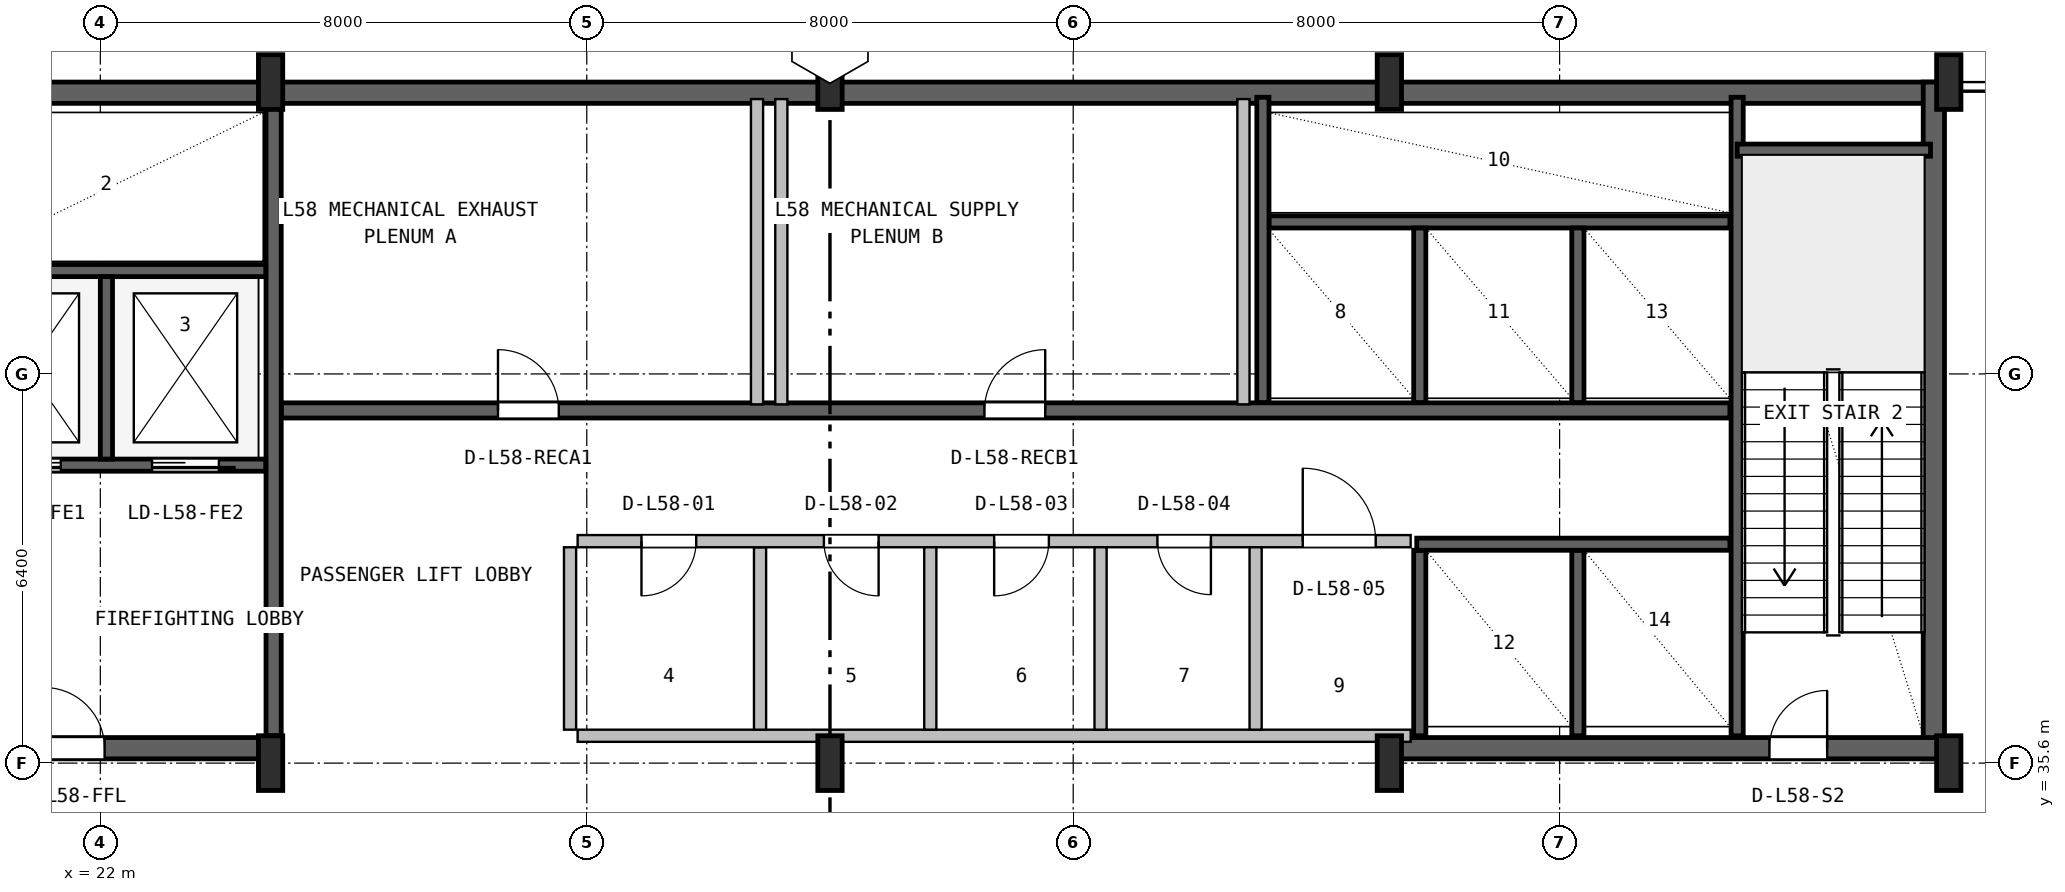
"""IFC4 building model, lengths in metres.
Left out: names, types, materials, properties, quantities, classifications, styles, units other than length and angle.
Written with IfcOpenShell. Run it as: python <this file> out.ifc"""

import sys

from ifc_helpers import new_model, si_unit, direction, frame, frame_2d, origin, origin_2d, place, context, subcontext, project, spatial, rectangle, i_section, extrude, source, transform, mapped, element, fill, save


model = new_model("IFC4")
c1 = context("Model", 3, precision=1e-05, world=origin(), true_north=direction((0.0, 1.0)))
c2 = subcontext(c1, "Body", "Model", "MODEL_VIEW")
j1 = project(units=[si_unit("LENGTHUNIT", "METRE"), si_unit("PLANEANGLEUNIT", "RADIAN")], contexts=[c1])
p1 = place(None, origin())
s1 = spatial("IfcSite", under=j1, at=p1, CompositionType="ELEMENT")
p2 = place(p1, origin())
s2 = spatial("IfcBuilding", under=s1, at=p2, CompositionType="ELEMENT")
p3 = place(p2, frame((0.0, 0.0, 234.0)))
s3 = spatial("IfcBuildingStorey", under=s2, at=p3, CompositionType="ELEMENT", Elevation=234.0)
p4 = place(p3, frame((15.6, 46.625, 0.0), z_axis=(0.0, 0.0, 1.0), x_axis=(1.0, 0.0, 0.0)))
e1 = element("IfcWall", 1, at=p4, inside=s3, PredefinedType="SHEAR", context=c2, shape_type="SweptSolid", body=[
    extrude(rectangle(XDim=36.8, YDim=0.35, at=frame_2d((18.4, 0.0))), origin(), (0.0, 0.0, 1.0), 5.15),
])
p5 = place(p3, frame((52.155, 35.67, 0.0), z_axis=(0.0, 0.0, 1.0), x_axis=(0.0, 1.0, 0.0)))
e2 = element("IfcWall", 2, at=p5, inside=s3, PredefinedType="SHEAR", context=c2, shape_type="SweptSolid", body=[
    extrude(rectangle(XDim=11.13, YDim=0.35, at=frame_2d((5.565, 0.0))), origin(), (0.0, 0.0, 1.0), 5.15),
])
p6 = place(p3, frame((15.67, 35.845, 0.0), z_axis=(0.0, 0.0, 1.0), x_axis=(1.0, 0.0, 0.0)))
e3 = element("IfcWall", 3, at=p6, inside=s3, PredefinedType="SHEAR", context=c2, shape_type="SweptSolid", body=[
    extrude(rectangle(XDim=9.13, YDim=0.35, at=frame_2d((4.565, 0.0))), origin(), (0.0, 0.0, 1.0), 5.15),
])
p7 = place(p6, frame((5.4, 0.0, 0.0)))
e4 = element("IfcOpeningElement", 4, at=p7, cuts=e3, PredefinedType="OPENING", context=c2, shape_type="SweptSolid", body=[
    extrude(rectangle(XDim=1.0, YDim=2.1, at=frame_2d((0.5, 1.05))), frame((0.0, 0.185, 0.0), z_axis=(0.0, -1.0, 0.0), x_axis=(1.0, 0.0, 0.0)), (0.0, 0.0, 1.0), 0.37),
])
p8 = place(p3, frame((43.2, 35.845, 0.0), z_axis=(0.0, 0.0, 1.0), x_axis=(1.0, 0.0, 0.0)))
e5 = element("IfcWall", 5, at=p8, inside=s3, PredefinedType="SHEAR", context=c2, shape_type="SweptSolid", body=[
    extrude(rectangle(XDim=9.13, YDim=0.35, at=frame_2d((4.565, 0.0))), origin(), (0.0, 0.0, 1.0), 5.15),
])
p9 = place(p8, frame((6.25, 0.0, 0.0)))
e6 = element("IfcOpeningElement", 6, at=p9, cuts=e5, PredefinedType="OPENING", context=c2, shape_type="SweptSolid", body=[
    extrude(rectangle(XDim=0.95, YDim=2.1, at=frame_2d((0.475, 1.05))), frame((0.0, 0.185, 0.0), z_axis=(0.0, -1.0, 0.0), x_axis=(1.0, 0.0, 0.0)), (0.0, 0.0, 1.0), 0.37),
])
m1 = source(origin(), c2, "Body", "SweptSolid", [
    extrude(i_section(OverallWidth=0.4, OverallDepth=0.9, WebThickness=0.016, FlangeThickness=0.028, FilletRadius=0.016, at=origin_2d()), origin(), (0.0, 0.0, 1.0), 5.4),
])
for number, where, z_axis, x_axis in (
    (7, (24.8, 35.6, 0.0), (0.0, 0.0, 1.0), (1.0, 0.0, 0.0)),
    (8, (24.8, 46.8, 0.0), (0.0, 0.0, 1.0), (1.0, 0.0, 0.0)),
    (9, (34.0, 35.6, 0.0), (0.0, 0.0, 1.0), (1.0, 0.0, 0.0)),
    (10, (34.0, 46.8, 0.0), (0.0, 0.0, 1.0), (1.0, 0.0, 0.0)),
    (11, (43.2, 35.6, 0.0), (0.0, 0.0, 1.0), (1.0, 0.0, 0.0)),
    (12, (43.2, 46.8, 0.0), (0.0, 0.0, 1.0), (1.0, 0.0, 0.0)),
    (13, (52.4, 35.6, 0.0), (0.0, 0.0, 1.0), (1.0, 0.0, 0.0)),
    (14, (52.4, 46.8, 0.0), (0.0, 0.0, 1.0), (1.0, 0.0, 0.0)),
):
    element("IfcColumn", number, at=place(p3, frame(where, z_axis=z_axis, x_axis=x_axis)), inside=s3, PredefinedType="COLUMN", context=c2, shape_type="MappedRepresentation", body=[
        mapped(m1, transform((0.0, 0.0, 0.0), x_axis=(1.0, 0.0, 0.0), y_axis=(0.0, 1.0, 0.0), z_axis=(0.0, 0.0, 1.0), scale=1.0)),
    ])
p10 = place(p3, frame((24.85, 36.05, 0.0), z_axis=(0.0, 0.0, 1.0), x_axis=(0.0, 1.0, 0.0)))
e15 = element("IfcWall", 15, at=p10, inside=s3, PredefinedType="SHEAR", context=c2, shape_type="SweptSolid", body=[
    extrude(rectangle(XDim=10.45, YDim=0.25, at=frame_2d((5.225, 0.0))), origin(), (0.0, 0.0, 1.0), 5.15),
])
p11 = place(p3, frame((19.2, 40.5, 0.0), z_axis=(0.0, 0.0, 1.0), x_axis=(1.0, 0.0, 0.0)))
e16 = element("IfcWall", 16, at=p11, inside=s3, PredefinedType="SHEAR", context=c2, shape_type="SweptSolid", body=[
    extrude(rectangle(XDim=5.52, YDim=0.2, at=frame_2d((2.76, 0.0))), origin(), (0.0, 0.0, 1.0), 5.15),
])
p12 = place(p11, frame((1.05, 0.0, 0.0)))
e17 = element("IfcOpeningElement", 17, at=p12, cuts=e16, PredefinedType="OPENING", context=c2, shape_type="SweptSolid", body=[
    extrude(rectangle(XDim=1.1, YDim=2.18, at=frame_2d((0.55, 1.09))), frame((0.0, 0.11, 0.0), z_axis=(0.0, -1.0, 0.0), x_axis=(1.0, 0.0, 0.0)), (0.0, 0.0, 1.0), 0.22),
])
p13 = place(p11, frame((3.65, 0.0, 0.0)))
e18 = element("IfcOpeningElement", 18, at=p13, cuts=e16, PredefinedType="OPENING", context=c2, shape_type="SweptSolid", body=[
    extrude(rectangle(XDim=1.1, YDim=2.18, at=frame_2d((0.55, 1.09))), frame((0.0, 0.11, 0.0), z_axis=(0.0, -1.0, 0.0), x_axis=(1.0, 0.0, 0.0)), (0.0, 0.0, 1.0), 0.22),
])
p14 = place(p3, frame((19.2, 43.7, 0.0), z_axis=(0.0, 0.0, 1.0), x_axis=(1.0, 0.0, 0.0)))
e19 = element("IfcWall", 19, at=p14, inside=s3, PredefinedType="SHEAR", context=c2, shape_type="SweptSolid", body=[
    extrude(rectangle(XDim=5.52, YDim=0.2, at=frame_2d((2.76, 0.0))), origin(), (0.0, 0.0, 1.0), 5.15),
])
p15 = place(p3, frame((22.1, 40.6, 0.0), z_axis=(0.0, 0.0, 1.0), x_axis=(0.0, 1.0, 0.0)))
e20 = element("IfcWall", 20, at=p15, inside=s3, PredefinedType="SHEAR", context=c2, shape_type="SweptSolid", body=[
    extrude(rectangle(XDim=3.0, YDim=0.2, at=frame_2d((1.5, 0.0))), origin(), (0.0, 0.0, 1.0), 5.15),
])
p16 = place(p3, frame((48.92, 36.05, 0.0), z_axis=(0.0, 0.0, 1.0), x_axis=(0.0, 1.0, 0.0)))
e21 = element("IfcWall", 21, at=p16, inside=s3, PredefinedType="SHEAR", context=c2, shape_type="SweptSolid", body=[
    extrude(rectangle(XDim=10.5, YDim=0.2, at=frame_2d((5.25, 0.0))), origin(), (0.0, 0.0, 1.0), 5.15),
])
p17 = place(p3, frame((48.92, 45.68, 0.0), z_axis=(0.0, 0.0, 1.0), x_axis=(1.0, 0.0, 0.0)))
e22 = element("IfcWall", 22, at=p17, inside=s3, PredefinedType="SHEAR", context=c2, shape_type="SweptSolid", body=[
    extrude(rectangle(XDim=3.18, YDim=0.2, at=frame_2d((1.59, 0.0))), origin(), (0.0, 0.0, 1.0), 5.15),
])
p18 = place(p3, frame((24.98, 41.4, 0.0), z_axis=(0.0, 0.0, 1.0), x_axis=(1.0, 0.0, 0.0)))
e23 = element("IfcWall", 23, at=p18, inside=s3, PredefinedType="SHEAR", context=c2, shape_type="SweptSolid", body=[
    extrude(rectangle(XDim=23.82, YDim=0.25, at=frame_2d((11.91, 0.0))), origin(), (0.0, 0.0, 1.0), 5.15),
])
p19 = place(p18, frame((3.56, 0.0, 0.0)))
e24 = element("IfcOpeningElement", 24, at=p19, cuts=e23, PredefinedType="OPENING", context=c2, shape_type="SweptSolid", body=[
    extrude(rectangle(XDim=1.0, YDim=2.08, at=frame_2d((0.5, 1.04))), frame((0.0, 0.135, 0.0), z_axis=(0.0, -1.0, 0.0), x_axis=(1.0, 0.0, 0.0)), (0.0, 0.0, 1.0), 0.27),
])
p20 = place(p18, frame((11.56, 0.0, 0.0)))
e25 = element("IfcOpeningElement", 25, at=p20, cuts=e23, PredefinedType="OPENING", context=c2, shape_type="SweptSolid", body=[
    extrude(rectangle(XDim=1.0, YDim=2.08, at=frame_2d((0.5, 1.04))), frame((0.0, 0.135, 0.0), z_axis=(0.0, -1.0, 0.0), x_axis=(1.0, 0.0, 0.0)), (0.0, 0.0, 1.0), 0.27),
])
p21 = place(p3, frame((41.22, 44.5, 0.0), z_axis=(0.0, 0.0, 1.0), x_axis=(1.0, 0.0, 0.0)))
e26 = element("IfcWall", 26, at=p21, inside=s3, PredefinedType="SHEAR", context=c2, shape_type="SweptSolid", body=[
    extrude(rectangle(XDim=7.58, YDim=0.2, at=frame_2d((3.79, 0.0))), origin(), (0.0, 0.0, 1.0), 5.15),
])
p22 = place(p3, frame((41.12, 41.53, 0.0), z_axis=(0.0, 0.0, 1.0), x_axis=(0.0, 1.0, 0.0)))
e27 = element("IfcWall", 27, at=p22, inside=s3, PredefinedType="SHEAR", context=c2, shape_type="SweptSolid", body=[
    extrude(rectangle(XDim=5.02, YDim=0.2, at=frame_2d((2.51, 0.0))), origin(), (0.0, 0.0, 1.0), 5.15),
])
for number, where, z_axis, x_axis in (
    (28, (43.7, 41.53, 0.0), (0.0, 0.0, 1.0), (0.0, 1.0, 0.0)),
    (29, (46.3, 41.53, 0.0), (0.0, 0.0, 1.0), (0.0, 1.0, 0.0)),
):
    element("IfcWall", number, at=place(p3, frame(where, z_axis=z_axis, x_axis=x_axis)), inside=s3, PredefinedType="SHEAR", context=c2, shape_type="SweptSolid", body=[
        extrude(rectangle(XDim=2.87, YDim=0.2, at=frame_2d((1.435, 0.0))), origin(), (0.0, 0.0, 1.0), 5.15),
    ])
for number, where, z_axis, x_axis in (
    (30, (43.7, 36.05, 0.0), (0.0, 0.0, 1.0), (0.0, 1.0, 0.0)),
    (31, (46.3, 36.05, 0.0), (0.0, 0.0, 1.0), (0.0, 1.0, 0.0)),
):
    element("IfcWall", number, at=place(p3, frame(where, z_axis=z_axis, x_axis=x_axis)), inside=s3, PredefinedType="SHEAR", context=c2, shape_type="SweptSolid", body=[
        extrude(rectangle(XDim=3.05, YDim=0.2, at=frame_2d((1.525, 0.0))), origin(), (0.0, 0.0, 1.0), 5.15),
    ])
p23 = place(p3, frame((43.65, 39.2, 0.0), z_axis=(0.0, 0.0, 1.0), x_axis=(1.0, 0.0, 0.0)))
e32 = element("IfcWall", 32, at=p23, inside=s3, PredefinedType="SHEAR", context=c2, shape_type="SweptSolid", body=[
    extrude(rectangle(XDim=5.15, YDim=0.2, at=frame_2d((2.575, 0.0))), origin(), (0.0, 0.0, 1.0), 5.15),
])
p24 = place(p3, frame((29.85, 36.05, 0.0), z_axis=(0.0, 0.0, 1.0), x_axis=(1.0, 0.0, 0.0)))
e33 = element("IfcWall", 33, at=p24, inside=s3, PredefinedType="SOLIDWALL", context=c2, shape_type="SweptSolid", body=[
    extrude(rectangle(XDim=13.7, YDim=0.2, at=frame_2d((6.85, 0.0))), origin(), (0.0, 0.0, 1.0), 5.13),
])
p25 = place(p3, frame((32.85, 36.15, 0.0), z_axis=(0.0, 0.0, 1.0), x_axis=(0.0, 1.0, 0.0)))
e34 = element("IfcWall", 34, at=p25, inside=s3, PredefinedType="SOLIDWALL", context=c2, shape_type="SweptSolid", body=[
    extrude(rectangle(XDim=3.0, YDim=0.2, at=frame_2d((1.5, 0.0))), origin(), (0.0, 0.0, 1.0), 5.13),
])
p26 = place(p3, frame((29.85, 39.25, 0.0), z_axis=(0.0, 0.0, 1.0), x_axis=(1.0, 0.0, 0.0)))
e35 = element("IfcWall", 35, at=p26, inside=s3, PredefinedType="SOLIDWALL", context=c2, shape_type="SweptSolid", body=[
    extrude(rectangle(XDim=13.7, YDim=0.2, at=frame_2d((6.85, 0.0))), origin(), (0.0, 0.0, 1.0), 5.13),
])
p27 = place(p26, frame((1.05, 0.0, 0.0)))
e36 = element("IfcOpeningElement", 36, at=p27, cuts=e35, PredefinedType="OPENING", context=c2, shape_type="SweptSolid", body=[
    extrude(rectangle(XDim=0.9, YDim=2.06, at=frame_2d((0.45, 1.03))), frame((0.0, 0.11, 0.0), z_axis=(0.0, -1.0, 0.0), x_axis=(1.0, 0.0, 0.0)), (0.0, 0.0, 1.0), 0.22),
])
p28 = place(p26, frame((4.05, 0.0, 0.0)))
e37 = element("IfcOpeningElement", 37, at=p28, cuts=e35, PredefinedType="OPENING", context=c2, shape_type="SweptSolid", body=[
    extrude(rectangle(XDim=0.9, YDim=2.06, at=frame_2d((0.45, 1.03))), frame((0.0, 0.11, 0.0), z_axis=(0.0, -1.0, 0.0), x_axis=(1.0, 0.0, 0.0)), (0.0, 0.0, 1.0), 0.22),
])
p29 = place(p26, frame((6.85, 0.0, 0.0)))
e38 = element("IfcOpeningElement", 38, at=p29, cuts=e35, PredefinedType="OPENING", context=c2, shape_type="SweptSolid", body=[
    extrude(rectangle(XDim=0.9, YDim=2.06, at=frame_2d((0.45, 1.03))), frame((0.0, 0.11, 0.0), z_axis=(0.0, -1.0, 0.0), x_axis=(1.0, 0.0, 0.0)), (0.0, 0.0, 1.0), 0.22),
])
p30 = place(p26, frame((9.535, 0.0, 0.0)))
e39 = element("IfcOpeningElement", 39, at=p30, cuts=e35, PredefinedType="OPENING", context=c2, shape_type="SweptSolid", body=[
    extrude(rectangle(XDim=0.88, YDim=2.06, at=frame_2d((0.44, 1.03))), frame((0.0, 0.11, 0.0), z_axis=(0.0, -1.0, 0.0), x_axis=(1.0, 0.0, 0.0)), (0.0, 0.0, 1.0), 0.22),
])
p31 = place(p26, frame((11.925, 0.0, 0.0)))
e40 = element("IfcOpeningElement", 40, at=p31, cuts=e35, PredefinedType="OPENING", context=c2, shape_type="SweptSolid", body=[
    extrude(rectangle(XDim=1.2, YDim=2.1, at=frame_2d((0.6, 1.05))), frame((0.0, 0.11, 0.0), z_axis=(0.0, -1.0, 0.0), x_axis=(1.0, 0.0, 0.0)), (0.0, 0.0, 1.0), 0.22),
])
for number, where, z_axis, x_axis in (
    (41, (29.725, 36.15, 0.0), (0.0, 0.0, 1.0), (0.0, 1.0, 0.0)),
    (42, (35.65, 36.15, 0.0), (0.0, 0.0, 1.0), (0.0, 1.0, 0.0)),
    (43, (38.45, 36.15, 0.0), (0.0, 0.0, 1.0), (0.0, 1.0, 0.0)),
    (44, (41.0, 36.15, 0.0), (0.0, 0.0, 1.0), (0.0, 1.0, 0.0)),
):
    element("IfcWall", number, at=place(p3, frame(where, z_axis=z_axis, x_axis=x_axis)), inside=s3, PredefinedType="SOLIDWALL", context=c2, shape_type="SweptSolid", body=[
        extrude(rectangle(XDim=3.0, YDim=0.2, at=frame_2d((1.5, 0.0))), origin(), (0.0, 0.0, 1.0), 5.13),
    ])
for number, where, z_axis, x_axis in (
    (45, (32.8, 41.5, 0.0), (0.0, 0.0, 1.0), (0.0, 1.0, 0.0)),
    (46, (40.8, 41.5, 0.0), (0.0, 0.0, 1.0), (0.0, 1.0, 0.0)),
    (47, (33.2, 41.5, 0.0), (0.0, 0.0, 1.0), (0.0, 1.0, 0.0)),
):
    element("IfcWall", number, at=place(p3, frame(where, z_axis=z_axis, x_axis=x_axis)), inside=s3, PredefinedType="SOLIDWALL", context=c2, shape_type="SweptSolid", body=[
        extrude(rectangle(XDim=5.02, YDim=0.2, at=frame_2d((2.51, 0.0))), origin(), (0.0, 0.0, 1.0), 5.13),
    ])
m2 = source(origin(), c2, "Body", "SweptSolid", [
    extrude(rectangle(XDim=1.0, YDim=2.1, at=frame_2d((0.5, 1.05))), frame((0.0, 0.025, 0.0), z_axis=(0.0, -1.0, 0.0), x_axis=(1.0, 0.0, 0.0)), (0.0, 0.0, 1.0), 0.05),
])
p32 = place(p7, origin())
e48 = element("IfcDoor", 48, at=p32, inside=s3, OperationType="SINGLE_SWING_LEFT", PredefinedType="DOOR", context=c2, shape_type="MappedRepresentation", body=[
    mapped(m2, transform((0.0, 0.0, 0.0), x_axis=(1.0, 0.0, 0.0), y_axis=(0.0, 1.0, 0.0), z_axis=(0.0, 0.0, 1.0), scale=1.0)),
])
fill(e4, e48)
m3 = source(origin(), c2, "Body", "SweptSolid", [
    extrude(rectangle(XDim=1.1, YDim=2.18, at=frame_2d((0.55, 1.09))), frame((0.0, 0.025, 0.0), z_axis=(0.0, -1.0, 0.0), x_axis=(1.0, 0.0, 0.0)), (0.0, 0.0, 1.0), 0.05),
])
p33 = place(p12, frame((1.1, 0.0, 0.0), z_axis=(0.0, 0.0, 1.0), x_axis=(-1.0, 0.0, 0.0)))
e49 = element("IfcDoor", 49, at=p33, inside=s3, OperationType="SLIDING_TO_LEFT", PredefinedType="DOOR", context=c2, shape_type="MappedRepresentation", body=[
    mapped(m3, transform((0.0, 0.0, 0.0), x_axis=(1.0, 0.0, 0.0), y_axis=(0.0, 1.0, 0.0), z_axis=(0.0, 0.0, 1.0), scale=1.0)),
])
fill(e17, e49)
p34 = place(p13, frame((1.1, 0.0, 0.0), z_axis=(0.0, 0.0, 1.0), x_axis=(-1.0, 0.0, 0.0)))
e50 = element("IfcDoor", 50, at=p34, inside=s3, OperationType="SLIDING_TO_RIGHT", PredefinedType="DOOR", context=c2, shape_type="MappedRepresentation", body=[
    mapped(m3, transform((0.0, 0.0, 0.0), x_axis=(1.0, 0.0, 0.0), y_axis=(0.0, 1.0, 0.0), z_axis=(0.0, 0.0, 1.0), scale=1.0)),
])
fill(e18, e50)
m4 = source(origin(), c2, "Body", "SweptSolid", [
    extrude(rectangle(XDim=0.95, YDim=2.1, at=frame_2d((0.475, 1.05))), frame((0.0, 0.025, 0.0), z_axis=(0.0, -1.0, 0.0), x_axis=(1.0, 0.0, 0.0)), (0.0, 0.0, 1.0), 0.05),
])
p35 = place(p9, origin())
e51 = element("IfcDoor", 51, at=p35, inside=s3, OperationType="SINGLE_SWING_RIGHT", PredefinedType="DOOR", context=c2, shape_type="MappedRepresentation", body=[
    mapped(m4, transform((0.0, 0.0, 0.0), x_axis=(1.0, 0.0, 0.0), y_axis=(0.0, 1.0, 0.0), z_axis=(0.0, 0.0, 1.0), scale=1.0)),
])
fill(e6, e51)
m5 = source(origin(), c2, "Body", "SweptSolid", [
    extrude(rectangle(XDim=1.0, YDim=2.08, at=frame_2d((0.5, 1.04))), frame((0.0, 0.025, 0.0), z_axis=(0.0, -1.0, 0.0), x_axis=(1.0, 0.0, 0.0)), (0.0, 0.0, 1.0), 0.05),
])
p36 = place(p19, origin())
e52 = element("IfcDoor", 52, at=p36, inside=s3, OperationType="SINGLE_SWING_LEFT", PredefinedType="DOOR", context=c2, shape_type="MappedRepresentation", body=[
    mapped(m5, transform((0.0, 0.0, 0.0), x_axis=(1.0, 0.0, 0.0), y_axis=(0.0, 1.0, 0.0), z_axis=(0.0, 0.0, 1.0), scale=1.0)),
])
fill(e24, e52)
p37 = place(p20, origin())
e53 = element("IfcDoor", 53, at=p37, inside=s3, OperationType="SINGLE_SWING_RIGHT", PredefinedType="DOOR", context=c2, shape_type="MappedRepresentation", body=[
    mapped(m5, transform((0.0, 0.0, 0.0), x_axis=(1.0, 0.0, 0.0), y_axis=(0.0, 1.0, 0.0), z_axis=(0.0, 0.0, 1.0), scale=1.0)),
])
fill(e25, e53)
m6 = source(origin(), c2, "Body", "SweptSolid", [
    extrude(rectangle(XDim=0.9, YDim=2.06, at=frame_2d((0.45, 1.03))), frame((0.0, 0.025, 0.0), z_axis=(0.0, -1.0, 0.0), x_axis=(1.0, 0.0, 0.0)), (0.0, 0.0, 1.0), 0.05),
])
p38 = place(p27, frame((0.9, 0.0, 0.0), z_axis=(0.0, 0.0, 1.0), x_axis=(-1.0, 0.0, 0.0)))
e54 = element("IfcDoor", 54, at=p38, inside=s3, OperationType="SINGLE_SWING_LEFT", PredefinedType="DOOR", context=c2, shape_type="MappedRepresentation", body=[
    mapped(m6, transform((0.0, 0.0, 0.0), x_axis=(1.0, 0.0, 0.0), y_axis=(0.0, 1.0, 0.0), z_axis=(0.0, 0.0, 1.0), scale=1.0)),
])
fill(e36, e54)
p39 = place(p28, frame((0.9, 0.0, 0.0), z_axis=(0.0, 0.0, 1.0), x_axis=(-1.0, 0.0, 0.0)))
e55 = element("IfcDoor", 55, at=p39, inside=s3, OperationType="SINGLE_SWING_RIGHT", PredefinedType="DOOR", context=c2, shape_type="MappedRepresentation", body=[
    mapped(m6, transform((0.0, 0.0, 0.0), x_axis=(1.0, 0.0, 0.0), y_axis=(0.0, 1.0, 0.0), z_axis=(0.0, 0.0, 1.0), scale=1.0)),
])
fill(e37, e55)
p40 = place(p29, frame((0.9, 0.0, 0.0), z_axis=(0.0, 0.0, 1.0), x_axis=(-1.0, 0.0, 0.0)))
e56 = element("IfcDoor", 56, at=p40, inside=s3, OperationType="SINGLE_SWING_LEFT", PredefinedType="DOOR", context=c2, shape_type="MappedRepresentation", body=[
    mapped(m6, transform((0.0, 0.0, 0.0), x_axis=(1.0, 0.0, 0.0), y_axis=(0.0, 1.0, 0.0), z_axis=(0.0, 0.0, 1.0), scale=1.0)),
])
fill(e38, e56)
m7 = source(origin(), c2, "Body", "SweptSolid", [
    extrude(rectangle(XDim=0.88, YDim=2.06, at=frame_2d((0.44, 1.03))), frame((0.0, 0.025, 0.0), z_axis=(0.0, -1.0, 0.0), x_axis=(1.0, 0.0, 0.0)), (0.0, 0.0, 1.0), 0.05),
])
p41 = place(p30, frame((0.88, 0.0, 0.0), z_axis=(0.0, 0.0, 1.0), x_axis=(-1.0, 0.0, 0.0)))
e57 = element("IfcDoor", 57, at=p41, inside=s3, OperationType="SINGLE_SWING_RIGHT", PredefinedType="DOOR", context=c2, shape_type="MappedRepresentation", body=[
    mapped(m7, transform((0.0, 0.0, 0.0), x_axis=(1.0, 0.0, 0.0), y_axis=(0.0, 1.0, 0.0), z_axis=(0.0, 0.0, 1.0), scale=1.0)),
])
fill(e39, e57)
m8 = source(origin(), c2, "Body", "SweptSolid", [
    extrude(rectangle(XDim=1.2, YDim=2.1, at=frame_2d((0.6, 1.05))), frame((0.0, 0.025, 0.0), z_axis=(0.0, -1.0, 0.0), x_axis=(1.0, 0.0, 0.0)), (0.0, 0.0, 1.0), 0.05),
])
p42 = place(p31, origin())
e58 = element("IfcDoor", 58, at=p42, inside=s3, OperationType="SINGLE_SWING_LEFT", PredefinedType="DOOR", context=c2, shape_type="MappedRepresentation", body=[
    mapped(m8, transform((0.0, 0.0, 0.0), x_axis=(1.0, 0.0, 0.0), y_axis=(0.0, 1.0, 0.0), z_axis=(0.0, 0.0, 1.0), scale=1.0)),
])
fill(e40, e58)
save(model, sys.argv[1])
